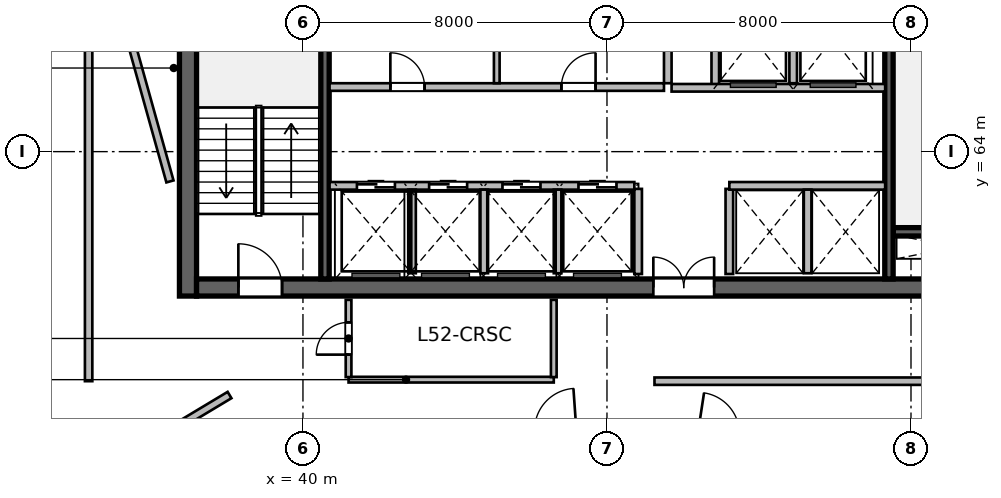
"""IFC4 building model, lengths in metres.
Left out: names, types, materials, properties, quantities, classifications, styles, units other than length and angle.
Written with IfcOpenShell. Run it as: python <this file> out.ifc"""

import sys

from ifc_helpers import new_model, si_unit, direction, frame, frame_2d, origin, place, context, subcontext, project, spatial, rectangle, extrude, source, transform, mapped, element, fill, save


model = new_model("IFC4")
c1 = context("Model", 3, precision=1e-05, world=origin(), true_north=direction((0.0, 1.0)))
c2 = subcontext(c1, "Body", "Model", "MODEL_VIEW")
j1 = project(units=[si_unit("LENGTHUNIT", "METRE"), si_unit("PLANEANGLEUNIT", "RADIAN")], contexts=[c1])
p1 = place(None, origin())
s1 = spatial("IfcSite", under=j1, at=p1, CompositionType="ELEMENT")
p2 = place(p1, origin())
s2 = spatial("IfcBuilding", under=s1, at=p2, CompositionType="ELEMENT")
p3 = place(p2, frame((0.0, 0.0, 215.7)))
s3 = spatial("IfcBuildingStorey", under=s2, at=p3, CompositionType="ELEMENT", Elevation=215.7)
m1 = source(origin(), c2, "Body", "SweptSolid", [
    extrude(rectangle(XDim=12.0, YDim=0.45, at=frame_2d((6.0, 0.0))), origin(), (0.0, 0.0, 1.0), 3.9),
])
p4 = place(p3, frame((36.975, 60.2, 0.0), z_axis=(0.0, 0.0, 1.0), x_axis=(0.0, 1.0, 0.0)))
e1 = element("IfcWall", 1, at=p4, inside=s3, PredefinedType="SHEAR", context=c2, shape_type="MappedRepresentation", body=[
    mapped(m1, transform((0.0, 0.0, 0.0), scale=1.0)),
])
m2 = source(origin(), c2, "Body", "SweptSolid", [
    extrude(rectangle(XDim=21.6, YDim=0.45, at=frame_2d((10.8, 0.0))), origin(), (0.0, 0.0, 1.0), 3.9),
])
p5 = place(p3, frame((37.2, 60.425, 0.0), z_axis=(0.0, 0.0, 1.0), x_axis=(1.0, 0.0, 0.0)))
e2 = element("IfcWall", 2, at=p5, inside=s3, PredefinedType="SHEAR", context=c2, shape_type="MappedRepresentation", body=[
    mapped(m2, transform((0.0, 0.0, 0.0), scale=1.0)),
])
p6 = place(p5, frame((1.1, 0.0, 0.0)))
e3 = element("IfcOpeningElement", 3, at=p6, cuts=e2, PredefinedType="OPENING", context=c2, shape_type="SweptSolid", body=[
    extrude(rectangle(XDim=1.15, YDim=2.15, at=frame_2d((0.575, 1.075))), frame((0.0, 0.235, 0.0), z_axis=(0.0, -1.0, 0.0), x_axis=(1.0, 0.0, 0.0)), (0.0, 0.0, 1.0), 0.47),
])
p7 = place(p5, frame((19.5, 0.0, 0.0)))
e4 = element("IfcOpeningElement", 4, at=p7, cuts=e2, PredefinedType="OPENING", context=c2, shape_type="SweptSolid", body=[
    extrude(rectangle(XDim=0.9, YDim=2.1, at=frame_2d((0.45, 1.05))), frame((0.0, 0.235, 0.0), z_axis=(0.0, -1.0, 0.0), x_axis=(1.0, 0.0, 0.0)), (0.0, 0.0, 1.0), 0.47),
])
p8 = place(p5, frame((12.02, 0.0, 0.0)))
e5 = element("IfcOpeningElement", 5, at=p8, cuts=e2, PredefinedType="OPENING", context=c2, shape_type="SweptSolid", body=[
    extrude(rectangle(XDim=1.6, YDim=2.15, at=frame_2d((0.8, 1.075))), frame((0.0, 0.235, 0.0), z_axis=(0.0, -1.0, 0.0), x_axis=(1.0, 0.0, 0.0)), (0.0, 0.0, 1.0), 0.47),
])
m3 = source(origin(), c2, "Body", "SweptSolid", [
    extrude(rectangle(XDim=3.27, YDim=0.22, at=frame_2d((1.635, 0.0))), origin(), (0.0, 0.0, 1.0), 3.9),
])
p9 = place(p3, frame((55.53, 61.89, 0.0), z_axis=(0.0, 0.0, 1.0), x_axis=(1.0, 0.0, 0.0)))
e6 = element("IfcWall", 6, at=p9, inside=s3, PredefinedType="SHEAR", context=c2, shape_type="MappedRepresentation", body=[
    mapped(m3, transform((0.0, 0.0, 0.0), scale=1.0)),
])
m4 = source(origin(), c2, "Body", "SweptSolid", [
    extrude(rectangle(XDim=11.1, YDim=0.22, at=frame_2d((5.55, 0.0))), origin(), (0.0, 0.0, 1.0), 3.9),
])
p10 = place(p3, frame((40.58, 60.65, 0.0), z_axis=(0.0, 0.0, 1.0), x_axis=(0.0, 1.0, 0.0)))
e7 = element("IfcWall", 7, at=p10, inside=s3, PredefinedType="SHEAR", context=c2, shape_type="MappedRepresentation", body=[
    mapped(m4, transform((0.0, 0.0, 0.0), scale=1.0)),
])
p11 = place(p3, frame((55.42, 60.65, 0.0), z_axis=(0.0, 0.0, 1.0), x_axis=(0.0, 1.0, 0.0)))
e8 = element("IfcWall", 8, at=p11, inside=s3, PredefinedType="SHEAR", context=c2, shape_type="MappedRepresentation", body=[
    mapped(m4, transform((0.0, 0.0, 0.0), scale=1.0)),
])
p12 = place(p11, frame((9.595, 0.0, 0.0)))
e9 = element("IfcOpeningElement", 9, at=p12, cuts=e8, PredefinedType="OPENING", context=c2, shape_type="SweptSolid", body=[
    extrude(rectangle(XDim=1.15, YDim=2.15, at=frame_2d((0.575, 1.075))), frame((0.0, 0.12, 0.0), z_axis=(0.0, -1.0, 0.0), x_axis=(1.0, 0.0, 0.0)), (0.0, 0.0, 1.0), 0.24),
])
m5 = source(origin(), c2, "Body", "SweptSolid", [
    extrude(rectangle(XDim=2.24, YDim=0.2, at=frame_2d((1.12, 0.0))), origin(), (0.0, 0.0, 1.0), 3.64),
])
for number, where, z_axis, x_axis in (
    (10, (48.82, 60.78, 0.0), (0.0, 0.0, 1.0), (0.0, 1.0, 0.0)),
    (11, (51.22, 60.78, 0.0), (0.0, 0.0, 1.0), (0.0, 1.0, 0.0)),
):
    element("IfcWall", number, at=place(p3, frame(where, z_axis=z_axis, x_axis=x_axis)), inside=s3, PredefinedType="SOLIDWALL", context=c2, shape_type="MappedRepresentation", body=[
        mapped(m5, transform((0.0, 0.0, 0.0), scale=1.0)),
    ])
m6 = source(origin(), c2, "Body", "SweptSolid", [
    extrude(rectangle(XDim=5.8, YDim=0.2, at=frame_2d((2.9, 0.0))), origin(), (0.0, 0.0, 1.0), 3.64),
])
p13 = place(p3, frame((49.6, 65.8, 0.0), z_axis=(0.0, 0.0, 1.0), x_axis=(0.0, 1.0, 0.0)))
e12 = element("IfcWall", 12, at=p13, inside=s3, PredefinedType="SOLIDWALL", context=c2, shape_type="MappedRepresentation", body=[
    mapped(m6, transform((0.0, 0.0, 0.0), scale=1.0)),
])
m7 = source(origin(), c2, "Body", "SweptSolid", [
    extrude(rectangle(XDim=2.58, YDim=0.2, at=frame_2d((1.29, 0.0))), origin(), (0.0, 0.0, 1.0), 3.64),
])
p14 = place(p3, frame((50.85, 65.68, 0.0), z_axis=(0.0, 0.0, 1.0), x_axis=(0.0, 1.0, 0.0)))
e13 = element("IfcWall", 13, at=p14, inside=s3, PredefinedType="SOLIDWALL", context=c2, shape_type="MappedRepresentation", body=[
    mapped(m7, transform((0.0, 0.0, 0.0), scale=1.0)),
])
m8 = source(origin(), c2, "Body", "SweptSolid", [
    extrude(rectangle(XDim=2.4, YDim=0.2, at=frame_2d((1.2, 0.0))), origin(), (0.0, 0.0, 1.0), 3.64),
])
p15 = place(p3, frame((52.9, 65.8, 0.0), z_axis=(0.0, 0.0, 1.0), x_axis=(0.0, 1.0, 0.0)))
e14 = element("IfcWall", 14, at=p15, inside=s3, PredefinedType="SOLIDWALL", context=c2, shape_type="MappedRepresentation", body=[
    mapped(m8, transform((0.0, 0.0, 0.0), scale=1.0)),
])
m9 = source(origin(), c2, "Body", "SweptSolid", [
    extrude(rectangle(XDim=5.62, YDim=0.2, at=frame_2d((2.81, 0.0))), origin(), (0.0, 0.0, 1.0), 3.64),
])
p16 = place(p3, frame((49.7, 65.68, 0.0), z_axis=(0.0, 0.0, 1.0), x_axis=(1.0, 0.0, 0.0)))
e15 = element("IfcWall", 15, at=p16, inside=s3, PredefinedType="SOLIDWALL", context=c2, shape_type="MappedRepresentation", body=[
    mapped(m9, transform((0.0, 0.0, 0.0), scale=1.0)),
])
m10 = source(origin(), c2, "Body", "SweptSolid", [
    extrude(rectangle(XDim=8.02, YDim=0.2, at=frame_2d((4.01, 0.0))), origin(), (0.0, 0.0, 1.0), 3.64),
])
p17 = place(p3, frame((40.7, 63.1, 0.0), z_axis=(0.0, 0.0, 1.0), x_axis=(1.0, 0.0, 0.0)))
e16 = element("IfcWall", 16, at=p17, inside=s3, PredefinedType="SOLIDWALL", context=c2, shape_type="MappedRepresentation", body=[
    mapped(m10, transform((0.0, 0.0, 0.0), scale=1.0)),
])
p18 = place(p17, frame((0.72, 0.0, 0.0)))
e17 = element("IfcOpeningElement", 17, at=p18, cuts=e16, PredefinedType="OPENING", context=c2, shape_type="SweptSolid", body=[
    extrude(rectangle(XDim=1.0, YDim=2.15, at=frame_2d((0.5, 1.075))), frame((0.0, 0.11, 0.0), z_axis=(0.0, -1.0, 0.0), x_axis=(1.0, 0.0, 0.0)), (0.0, 0.0, 1.0), 0.22),
])
p19 = place(p17, frame((2.62, 0.0, 0.0)))
e18 = element("IfcOpeningElement", 18, at=p19, cuts=e16, PredefinedType="OPENING", context=c2, shape_type="SweptSolid", body=[
    extrude(rectangle(XDim=1.0, YDim=2.15, at=frame_2d((0.5, 1.075))), frame((0.0, 0.11, 0.0), z_axis=(0.0, -1.0, 0.0), x_axis=(1.0, 0.0, 0.0)), (0.0, 0.0, 1.0), 0.22),
])
p20 = place(p17, frame((4.55, 0.0, 0.0)))
e19 = element("IfcOpeningElement", 19, at=p20, cuts=e16, PredefinedType="OPENING", context=c2, shape_type="SweptSolid", body=[
    extrude(rectangle(XDim=1.0, YDim=2.15, at=frame_2d((0.5, 1.075))), frame((0.0, 0.11, 0.0), z_axis=(0.0, -1.0, 0.0), x_axis=(1.0, 0.0, 0.0)), (0.0, 0.0, 1.0), 0.22),
])
p21 = place(p17, frame((6.55, 0.0, 0.0)))
e20 = element("IfcOpeningElement", 20, at=p21, cuts=e16, PredefinedType="OPENING", context=c2, shape_type="SweptSolid", body=[
    extrude(rectangle(XDim=1.0, YDim=2.15, at=frame_2d((0.5, 1.075))), frame((0.0, 0.11, 0.0), z_axis=(0.0, -1.0, 0.0), x_axis=(1.0, 0.0, 0.0)), (0.0, 0.0, 1.0), 0.22),
])
m11 = source(origin(), c2, "Body", "SweptSolid", [
    extrude(rectangle(XDim=4.1, YDim=0.2, at=frame_2d((2.05, 0.0))), origin(), (0.0, 0.0, 1.0), 3.64),
])
p22 = place(p3, frame((51.22, 63.1, 0.0), z_axis=(0.0, 0.0, 1.0), x_axis=(1.0, 0.0, 0.0)))
e21 = element("IfcWall", 21, at=p22, inside=s3, PredefinedType="SOLIDWALL", context=c2, shape_type="MappedRepresentation", body=[
    mapped(m11, transform((0.0, 0.0, 0.0), scale=1.0)),
])
m12 = source(origin(), c2, "Body", "SweptSolid", [
    extrude(rectangle(XDim=2.2, YDim=0.2, at=frame_2d((1.1, 0.0))), origin(), (0.0, 0.0, 1.0), 3.64),
])
for number, where, z_axis, x_axis in (
    (22, (42.87, 60.8, 0.0), (0.0, 0.0, 1.0), (0.0, 1.0, 0.0)),
    (23, (44.77, 60.8, 0.0), (0.0, 0.0, 1.0), (0.0, 1.0, 0.0)),
    (24, (46.7, 60.8, 0.0), (0.0, 0.0, 1.0), (0.0, 1.0, 0.0)),
    (25, (53.28, 60.8, 0.0), (0.0, 0.0, 1.0), (0.0, 1.0, 0.0)),
):
    element("IfcWall", number, at=place(p3, frame(where, z_axis=z_axis, x_axis=x_axis)), inside=s3, PredefinedType="SOLIDWALL", context=c2, shape_type="MappedRepresentation", body=[
        mapped(m12, transform((0.0, 0.0, 0.0), scale=1.0)),
    ])
m13 = source(origin(), c2, "Body", "SweptSolid", [
    extrude(rectangle(XDim=8.8, YDim=0.2, at=frame_2d((4.4, 0.0))), origin(), (0.0, 0.0, 1.0), 3.64),
])
p23 = place(p3, frame((40.7, 65.7, 0.0), z_axis=(0.0, 0.0, 1.0), x_axis=(1.0, 0.0, 0.0)))
e26 = element("IfcWall", 26, at=p23, inside=s3, PredefinedType="SOLIDWALL", context=c2, shape_type="MappedRepresentation", body=[
    mapped(m13, transform((0.0, 0.0, 0.0), scale=1.0)),
])
p24 = place(p23, frame((1.6, 0.0, 0.0)))
e27 = element("IfcOpeningElement", 27, at=p24, cuts=e26, PredefinedType="OPENING", context=c2, shape_type="SweptSolid", body=[
    extrude(rectangle(XDim=0.9, YDim=2.1, at=frame_2d((0.45, 1.05))), frame((0.0, 0.11, 0.0), z_axis=(0.0, -1.0, 0.0), x_axis=(1.0, 0.0, 0.0)), (0.0, 0.0, 1.0), 0.22),
])
p25 = place(p23, frame((6.1, 0.0, 0.0)))
e28 = element("IfcOpeningElement", 28, at=p25, cuts=e26, PredefinedType="OPENING", context=c2, shape_type="SweptSolid", body=[
    extrude(rectangle(XDim=0.9, YDim=2.1, at=frame_2d((0.45, 1.05))), frame((0.0, 0.11, 0.0), z_axis=(0.0, -1.0, 0.0), x_axis=(1.0, 0.0, 0.0)), (0.0, 0.0, 1.0), 0.22),
])
m14 = source(origin(), c2, "Body", "SweptSolid", [
    extrude(rectangle(XDim=2.4, YDim=0.15, at=frame_2d((1.2, 0.0))), origin(), (0.0, 0.0, 1.0), 3.64),
])
p26 = place(p3, frame((45.1, 65.8, 0.0), z_axis=(0.0, 0.0, 1.0), x_axis=(0.0, 1.0, 0.0)))
e29 = element("IfcWall", 29, at=p26, inside=s3, PredefinedType="PARTITIONING", context=c2, shape_type="MappedRepresentation", body=[
    mapped(m14, transform((0.0, 0.0, 0.0), scale=1.0)),
])
m15 = source(origin(), c2, "Body", "SweptSolid", [
    extrude(rectangle(XDim=5.4, YDim=0.15, at=frame_2d((2.7, 0.0))), origin(), (0.0, 0.0, 1.0), 3.64),
])
p27 = place(p3, frame((41.2, 58.0, 0.0), z_axis=(0.0, 0.0, 1.0), x_axis=(1.0, 0.0, 0.0)))
e30 = element("IfcWall", 30, at=p27, inside=s3, PredefinedType="PARTITIONING", context=c2, shape_type="MappedRepresentation", body=[
    mapped(m15, transform((0.0, 0.0, 0.0), scale=1.0)),
])
m16 = source(origin(), c2, "Body", "SweptSolid", [
    extrude(rectangle(XDim=2.033, YDim=0.15, at=frame_2d((1.016, 0.0))), origin(), (0.0, 0.0, 1.0), 3.64),
])
p28 = place(p3, frame((41.2, 58.067, 0.0), z_axis=(0.0, 0.0, 1.0), x_axis=(0.0, 1.0, 0.0)))
e31 = element("IfcWall", 31, at=p28, inside=s3, PredefinedType="PARTITIONING", context=c2, shape_type="MappedRepresentation", body=[
    mapped(m16, transform((0.0, 0.0, 0.0), scale=1.0)),
])
p29 = place(p28, frame((0.591, 0.0, 0.0)))
e32 = element("IfcOpeningElement", 32, at=p29, cuts=e31, PredefinedType="OPENING", context=c2, shape_type="SweptSolid", body=[
    extrude(rectangle(XDim=0.85, YDim=2.1, at=frame_2d((0.425, 1.05))), frame((0.0, 0.085, 0.0), z_axis=(0.0, -1.0, 0.0), x_axis=(1.0, 0.0, 0.0)), (0.0, 0.0, 1.0), 0.17),
])
p30 = place(p3, frame((46.6, 58.067, 0.0), z_axis=(0.0, 0.0, 1.0), x_axis=(0.0, 1.0, 0.0)))
e33 = element("IfcWall", 33, at=p30, inside=s3, PredefinedType="PARTITIONING", context=c2, shape_type="MappedRepresentation", body=[
    mapped(m16, transform((0.0, 0.0, 0.0), scale=1.0)),
])
m17 = source(origin(), c2, "Body", "SweptSolid", [
    extrude(rectangle(XDim=3.817, YDim=0.195, at=frame_2d((1.909, 0.0))), origin(), (0.0, 0.0, 1.0), 3.64),
])
p31 = place(p3, frame((34.795, 55.632, 0.0), z_axis=(0.0, 0.0, 1.0), x_axis=(0.857453418218, 0.514561595522, 0.0)))
e34 = element("IfcWall", 34, at=p31, inside=s3, PredefinedType="PARTITIONING", context=c2, shape_type="MappedRepresentation", body=[
    mapped(m17, transform((0.0, 0.0, 0.0), scale=1.0)),
])
m18 = source(origin(), c2, "Body", "SweptSolid", [
    extrude(rectangle(XDim=13.694, YDim=0.195, at=frame_2d((6.847, 0.0))), origin(), (0.0, 0.0, 1.0), 3.64),
])
p32 = place(p3, frame((36.5, 63.216, 0.0), z_axis=(0.0, 0.0, 1.0), x_axis=(-0.268753576604, 0.963208967495, 0.0)))
e35 = element("IfcWall", 35, at=p32, inside=s3, PredefinedType="PARTITIONING", context=c2, shape_type="MappedRepresentation", body=[
    mapped(m18, transform((0.0, 0.0, 0.0), scale=1.0)),
])
m19 = source(origin(), c2, "Body", "SweptSolid", [
    extrude(rectangle(XDim=19.209, YDim=0.195, at=frame_2d((9.604, 0.0))), origin(), (0.0, 0.0, 1.0), 3.64),
])
p33 = place(p3, frame((34.36, 57.96, 0.0), z_axis=(0.0, 0.0, 1.0), x_axis=(0.0, 1.0, 0.0)))
e36 = element("IfcWall", 36, at=p33, inside=s3, PredefinedType="PARTITIONING", context=c2, shape_type="MappedRepresentation", body=[
    mapped(m19, transform((0.0, 0.0, 0.0), scale=1.0)),
])
m20 = source(origin(), c2, "Body", "SweptSolid", [
    extrude(rectangle(XDim=12.39, YDim=0.195, at=frame_2d((6.195, 0.0))), origin(), (0.0, 0.0, 1.0), 3.64),
])
p34 = place(p3, frame((49.25, 57.96, 0.0), z_axis=(0.0, 0.0, 1.0), x_axis=(1.0, 0.0, 0.0)))
e37 = element("IfcWall", 37, at=p34, inside=s3, PredefinedType="PARTITIONING", context=c2, shape_type="MappedRepresentation", body=[
    mapped(m20, transform((0.0, 0.0, 0.0), scale=1.0)),
])
m21 = source(origin(), c2, "Body", "SweptSolid", [
    extrude(rectangle(XDim=1.15, YDim=2.15, at=frame_2d((0.575, 1.075))), frame((0.0, 0.025, 0.0), z_axis=(0.0, -1.0, 0.0), x_axis=(1.0, 0.0, 0.0)), (0.0, 0.0, 1.0), 0.05),
])
p35 = place(p6, origin())
e38 = element("IfcDoor", 38, at=p35, inside=s3, OperationType="SINGLE_SWING_LEFT", PredefinedType="DOOR", context=c2, shape_type="MappedRepresentation", body=[
    mapped(m21, transform((0.0, 0.0, 0.0), scale=1.0)),
])
fill(e3, e38)
m22 = source(origin(), c2, "Body", "SweptSolid", [
    extrude(rectangle(XDim=1.6, YDim=2.15, at=frame_2d((0.8, 1.075))), frame((0.0, 0.025, 0.0), z_axis=(0.0, -1.0, 0.0), x_axis=(1.0, 0.0, 0.0)), (0.0, 0.0, 1.0), 0.05),
])
p36 = place(p8, origin())
e39 = element("IfcDoor", 39, at=p36, inside=s3, OperationType="DOUBLE_DOOR_SINGLE_SWING", PredefinedType="DOOR", context=c2, shape_type="MappedRepresentation", body=[
    mapped(m22, transform((0.0, 0.0, 0.0), scale=1.0)),
])
fill(e5, e39)
m23 = source(origin(), c2, "Body", "SweptSolid", [
    extrude(rectangle(XDim=1.0, YDim=2.15, at=frame_2d((0.5, 1.075))), frame((0.0, 0.025, 0.0), z_axis=(0.0, -1.0, 0.0), x_axis=(1.0, 0.0, 0.0)), (0.0, 0.0, 1.0), 0.05),
])
p37 = place(p18, origin())
e40 = element("IfcDoor", 40, at=p37, inside=s3, OperationType="DOUBLE_DOOR_SLIDING", PredefinedType="DOOR", context=c2, shape_type="MappedRepresentation", body=[
    mapped(m23, transform((0.0, 0.0, 0.0), scale=1.0)),
])
fill(e17, e40)
p38 = place(p19, origin())
e41 = element("IfcDoor", 41, at=p38, inside=s3, OperationType="DOUBLE_DOOR_SLIDING", PredefinedType="DOOR", context=c2, shape_type="MappedRepresentation", body=[
    mapped(m23, transform((0.0, 0.0, 0.0), scale=1.0)),
])
fill(e18, e41)
p39 = place(p20, origin())
e42 = element("IfcDoor", 42, at=p39, inside=s3, OperationType="DOUBLE_DOOR_SLIDING", PredefinedType="DOOR", context=c2, shape_type="MappedRepresentation", body=[
    mapped(m23, transform((0.0, 0.0, 0.0), scale=1.0)),
])
fill(e19, e42)
p40 = place(p21, origin())
e43 = element("IfcDoor", 43, at=p40, inside=s3, OperationType="DOUBLE_DOOR_SLIDING", PredefinedType="DOOR", context=c2, shape_type="MappedRepresentation", body=[
    mapped(m23, transform((0.0, 0.0, 0.0), scale=1.0)),
])
fill(e20, e43)
m24 = source(origin(), c2, "Body", "SweptSolid", [
    extrude(rectangle(XDim=0.9, YDim=2.1, at=frame_2d((0.45, 1.05))), frame((0.0, 0.025, 0.0), z_axis=(0.0, -1.0, 0.0), x_axis=(1.0, 0.0, 0.0)), (0.0, 0.0, 1.0), 0.05),
])
p41 = place(p24, origin())
e44 = element("IfcDoor", 44, at=p41, inside=s3, OperationType="SINGLE_SWING_LEFT", PredefinedType="DOOR", context=c2, shape_type="MappedRepresentation", body=[
    mapped(m24, transform((0.0, 0.0, 0.0), scale=1.0)),
])
fill(e27, e44)
p42 = place(p25, origin())
e45 = element("IfcDoor", 45, at=p42, inside=s3, OperationType="SINGLE_SWING_RIGHT", PredefinedType="DOOR", context=c2, shape_type="MappedRepresentation", body=[
    mapped(m24, transform((0.0, 0.0, 0.0), scale=1.0)),
])
fill(e28, e45)
m25 = source(origin(), c2, "Body", "SweptSolid", [
    extrude(rectangle(XDim=0.85, YDim=2.1, at=frame_2d((0.425, 1.05))), frame((0.0, 0.025, 0.0), z_axis=(0.0, -1.0, 0.0), x_axis=(1.0, 0.0, 0.0)), (0.0, 0.0, 1.0), 0.05),
])
p43 = place(p29, origin())
e46 = element("IfcDoor", 46, at=p43, inside=s3, OperationType="SINGLE_SWING_LEFT", PredefinedType="DOOR", context=c2, shape_type="MappedRepresentation", body=[
    mapped(m25, transform((0.0, 0.0, 0.0), scale=1.0)),
])
fill(e32, e46)
save(model, sys.argv[1])
